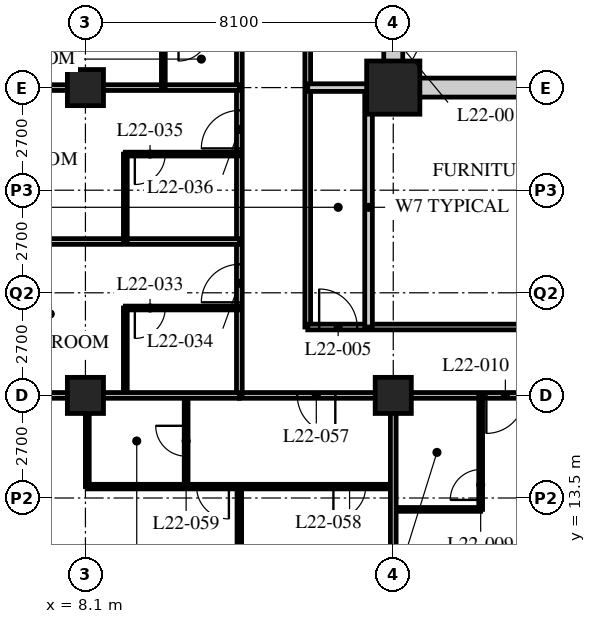
"""IFC4 building model, lengths in metres.
Left out: names, types, materials, properties, quantities, classifications, styles, units other than length and angle.
Written with IfcOpenShell. Run it as: python <this file> out.ifc"""

import sys

from ifc_helpers import new_model, si_unit, direction, frame, frame_2d, origin, origin_2d, place, context, subcontext, project, spatial, rectangle, hollow_rectangle, extrude, element, fill, save


model = new_model("IFC4")
c1 = context("Model", 3, precision=1e-05, world=origin(), true_north=direction((0.0, 1.0)))
c2 = subcontext(c1, "Body", "Model", "MODEL_VIEW")
j1 = project(units=[si_unit("LENGTHUNIT", "METRE"), si_unit("PLANEANGLEUNIT", "RADIAN")], contexts=[c1])
p1 = place(None, origin())
s1 = spatial("IfcSite", under=j1, at=p1, CompositionType="ELEMENT")
p2 = place(p1, origin())
s2 = spatial("IfcBuilding", under=s1, at=p2, CompositionType="ELEMENT")
p3 = place(p2, frame((0.0, 0.0, 87.4)))
s3 = spatial("IfcBuildingStorey", under=s2, at=p3, CompositionType="ELEMENT", Elevation=87.4)
for number, where, z_axis, x_axis in (
    (1, (8.1, 16.2, 0.0), (0.0, 0.0, 1.0), (1.0, 0.0, 0.0)),
    (2, (8.1, 24.3, 0.0), (0.0, 0.0, 1.0), (1.0, 0.0, 0.0)),
    (3, (16.2, 16.2, 0.0), (0.0, 0.0, 1.0), (1.0, 0.0, 0.0)),
):
    element("IfcColumn", number, at=place(p3, frame(where, z_axis=z_axis, x_axis=x_axis)), inside=s3, PredefinedType="COLUMN", context=c2, shape_type="SweptSolid", body=[
        extrude(hollow_rectangle(XDim=0.95, YDim=0.95, WallThickness=0.095, at=origin_2d()), origin(), (0.0, 0.0, 1.0), 3.4),
    ])
p4 = place(p3, frame((16.2, 24.3, 0.0), z_axis=(0.0, 0.0, 1.0), x_axis=(1.0, 0.0, 0.0)))
e4 = element("IfcColumn", 4, at=p4, inside=s3, PredefinedType="COLUMN", context=c2, shape_type="SweptSolid", body=[
    extrude(hollow_rectangle(XDim=1.4, YDim=1.4, WallThickness=0.12, at=origin_2d()), origin(), (0.0, 0.0, 1.0), 3.4),
])
p5 = place(p3, frame((12.15, 16.2, 0.0), z_axis=(0.0, 0.0, 1.0), x_axis=(1.0, 0.0, 0.0)))
e5 = element("IfcWall", 5, at=p5, inside=s3, PredefinedType="PARTITIONING", context=c2, shape_type="SweptSolid", body=[
    extrude(rectangle(XDim=32.4, YDim=0.15, at=frame_2d((16.2, 0.0))), origin(), (0.0, 0.0, 1.0), 2.388),
])
p6 = place(p5, frame((6.5, 0.0, 0.0)))
e6 = element("IfcOpeningElement", 6, at=p6, cuts=e5, PredefinedType="OPENING", context=c2, shape_type="SweptSolid", body=[
    extrude(rectangle(XDim=1.0, YDim=2.1, at=frame_2d((0.5, 1.05))), frame((0.0, 0.085, 0.0), z_axis=(0.0, -1.0, 0.0), x_axis=(1.0, 0.0, 0.0)), (0.0, 0.0, 1.0), 0.17),
])
p7 = place(p5, frame((8.4, 0.0, 0.0)))
e7 = element("IfcOpeningElement", 7, at=p7, cuts=e5, PredefinedType="OPENING", context=c2, shape_type="SweptSolid", body=[
    extrude(rectangle(XDim=1.0, YDim=2.1, at=frame_2d((0.5, 1.05))), frame((0.0, 0.085, 0.0), z_axis=(0.0, -1.0, 0.0), x_axis=(1.0, 0.0, 0.0)), (0.0, 0.0, 1.0), 0.17),
])
p8 = place(p5, frame((14.9, 0.0, 0.0)))
e8 = element("IfcOpeningElement", 8, at=p8, cuts=e5, PredefinedType="OPENING", context=c2, shape_type="SweptSolid", body=[
    extrude(rectangle(XDim=1.0, YDim=2.1, at=frame_2d((0.5, 1.05))), frame((0.0, 0.085, 0.0), z_axis=(0.0, -1.0, 0.0), x_axis=(1.0, 0.0, 0.0)), (0.0, 0.0, 1.0), 0.17),
])
p9 = place(p5, frame((16.5, 0.0, 0.0)))
e9 = element("IfcOpeningElement", 9, at=p9, cuts=e5, PredefinedType="OPENING", context=c2, shape_type="SweptSolid", body=[
    extrude(rectangle(XDim=1.0, YDim=2.1, at=frame_2d((0.5, 1.05))), frame((0.0, 0.085, 0.0), z_axis=(0.0, -1.0, 0.0), x_axis=(1.0, 0.0, 0.0)), (0.0, 0.0, 1.0), 0.17),
])
p10 = place(p5, frame((23.0, 0.0, 0.0)))
e10 = element("IfcOpeningElement", 10, at=p10, cuts=e5, PredefinedType="OPENING", context=c2, shape_type="SweptSolid", body=[
    extrude(rectangle(XDim=1.0, YDim=2.1, at=frame_2d((0.5, 1.05))), frame((0.0, 0.085, 0.0), z_axis=(0.0, -1.0, 0.0), x_axis=(1.0, 0.0, 0.0)), (0.0, 0.0, 1.0), 0.17),
])
p11 = place(p5, frame((24.9, 0.0, 0.0)))
e11 = element("IfcOpeningElement", 11, at=p11, cuts=e5, PredefinedType="OPENING", context=c2, shape_type="SweptSolid", body=[
    extrude(rectangle(XDim=1.0, YDim=2.1, at=frame_2d((0.5, 1.05))), frame((0.0, 0.085, 0.0), z_axis=(0.0, -1.0, 0.0), x_axis=(1.0, 0.0, 0.0)), (0.0, 0.0, 1.0), 0.17),
])
p12 = place(p5, frame((1.525, 0.0, 0.0)))
e12 = element("IfcOpeningElement", 12, at=p12, cuts=e5, PredefinedType="OPENING", context=c2, shape_type="SweptSolid", body=[
    extrude(rectangle(XDim=1.0, YDim=2.1, at=frame_2d((0.5, 1.05))), frame((0.0, 0.085, 0.0), z_axis=(0.0, -1.0, 0.0), x_axis=(1.0, 0.0, 0.0)), (0.0, 0.0, 1.0), 0.17),
])
p13 = place(p5, frame((29.875, 0.0, 0.0)))
e13 = element("IfcOpeningElement", 13, at=p13, cuts=e5, PredefinedType="OPENING", context=c2, shape_type="SweptSolid", body=[
    extrude(rectangle(XDim=1.0, YDim=2.1, at=frame_2d((0.5, 1.05))), frame((0.0, 0.085, 0.0), z_axis=(0.0, -1.0, 0.0), x_axis=(1.0, 0.0, 0.0)), (0.0, 0.0, 1.0), 0.17),
])
p14 = place(p3, frame((12.15, 16.2, 0.0), z_axis=(0.0, 0.0, 1.0), x_axis=(0.0, 1.0, 0.0)))
e14 = element("IfcWall", 14, at=p14, inside=s3, PredefinedType="PARTITIONING", context=c2, shape_type="SweptSolid", body=[
    extrude(rectangle(XDim=26.1, YDim=0.15, at=frame_2d((13.05, 0.0))), origin(), (0.0, 0.0, 1.0), 3.15),
])
p15 = place(p14, frame((2.45, 0.0, 0.0)))
e15 = element("IfcOpeningElement", 15, at=p15, cuts=e14, PredefinedType="OPENING", context=c2, shape_type="SweptSolid", body=[
    extrude(rectangle(XDim=1.0, YDim=2.1, at=frame_2d((0.5, 1.05))), frame((0.0, 0.085, 0.0), z_axis=(0.0, -1.0, 0.0), x_axis=(1.0, 0.0, 0.0)), (0.0, 0.0, 1.0), 0.17),
])
p16 = place(p14, frame((6.5, 0.0, 0.0)))
e16 = element("IfcOpeningElement", 16, at=p16, cuts=e14, PredefinedType="OPENING", context=c2, shape_type="SweptSolid", body=[
    extrude(rectangle(XDim=1.0, YDim=2.1, at=frame_2d((0.5, 1.05))), frame((0.0, 0.085, 0.0), z_axis=(0.0, -1.0, 0.0), x_axis=(1.0, 0.0, 0.0)), (0.0, 0.0, 1.0), 0.17),
])
p17 = place(p14, frame((10.0, 0.0, 0.0)))
e17 = element("IfcOpeningElement", 17, at=p17, cuts=e14, PredefinedType="OPENING", context=c2, shape_type="SweptSolid", body=[
    extrude(rectangle(XDim=1.0, YDim=2.1, at=frame_2d((0.5, 1.05))), frame((0.0, 0.085, 0.0), z_axis=(0.0, -1.0, 0.0), x_axis=(1.0, 0.0, 0.0)), (0.0, 0.0, 1.0), 0.17),
])
p18 = place(p14, frame((18.1, 0.0, 0.0)))
e18 = element("IfcOpeningElement", 18, at=p18, cuts=e14, PredefinedType="OPENING", context=c2, shape_type="SweptSolid", body=[
    extrude(rectangle(XDim=1.0, YDim=2.1, at=frame_2d((0.5, 1.05))), frame((0.0, 0.085, 0.0), z_axis=(0.0, -1.0, 0.0), x_axis=(1.0, 0.0, 0.0)), (0.0, 0.0, 1.0), 0.17),
])
p19 = place(p3, frame((13.95, 40.5, 0.0), z_axis=(0.0, 0.0, 1.0), x_axis=(0.0, -1.0, 0.0)))
e19 = element("IfcWall", 19, at=p19, inside=s3, PredefinedType="PARTITIONING", context=c2, shape_type="SweptSolid", body=[
    extrude(rectangle(XDim=22.5, YDim=0.15, at=frame_2d((11.25, 0.0))), origin(), (0.0, 0.0, 1.0), 3.15),
])
p20 = place(p19, frame((11.65, 0.0, 0.0)))
e20 = element("IfcOpeningElement", 20, at=p20, cuts=e19, PredefinedType="OPENING", context=c2, shape_type="SweptSolid", body=[
    extrude(rectangle(XDim=1.0, YDim=2.1, at=frame_2d((0.5, 1.05))), frame((0.0, 0.085, 0.0), z_axis=(0.0, -1.0, 0.0), x_axis=(1.0, 0.0, 0.0)), (0.0, 0.0, 1.0), 0.17),
])
p21 = place(p19, frame((3.55, 0.0, 0.0)))
e21 = element("IfcOpeningElement", 21, at=p21, cuts=e19, PredefinedType="OPENING", context=c2, shape_type="SweptSolid", body=[
    extrude(rectangle(XDim=1.0, YDim=2.1, at=frame_2d((0.5, 1.05))), frame((0.0, 0.085, 0.0), z_axis=(0.0, -1.0, 0.0), x_axis=(1.0, 0.0, 0.0)), (0.0, 0.0, 1.0), 0.17),
])
p22 = place(p3, frame((13.95, 18.0, 0.0), z_axis=(0.0, 0.0, 1.0), x_axis=(1.0, 0.0, 0.0)))
e22 = element("IfcWall", 22, at=p22, inside=s3, PredefinedType="PARTITIONING", context=c2, shape_type="SweptSolid", body=[
    extrude(rectangle(XDim=13.19, YDim=0.15, at=frame_2d((6.595, 0.0))), origin(), (0.0, 0.0, 1.0), 3.15),
])
p23 = place(p22, frame((0.3, 0.0, 0.0)))
e23 = element("IfcOpeningElement", 23, at=p23, cuts=e22, PredefinedType="OPENING", context=c2, shape_type="SweptSolid", body=[
    extrude(rectangle(XDim=1.0, YDim=2.1, at=frame_2d((0.5, 1.05))), frame((0.0, 0.085, 0.0), z_axis=(0.0, -1.0, 0.0), x_axis=(1.0, 0.0, 0.0)), (0.0, 0.0, 1.0), 0.17),
])
p24 = place(p22, frame((6.9, 0.0, 0.0)))
e24 = element("IfcOpeningElement", 24, at=p24, cuts=e22, PredefinedType="OPENING", context=c2, shape_type="SweptSolid", body=[
    extrude(rectangle(XDim=1.0, YDim=2.1, at=frame_2d((0.5, 1.05))), frame((0.0, 0.085, 0.0), z_axis=(0.0, -1.0, 0.0), x_axis=(1.0, 0.0, 0.0)), (0.0, 0.0, 1.0), 0.17),
])
p25 = place(p3, frame((15.55, 18.0, 0.0), z_axis=(0.0, 0.0, 1.0), x_axis=(0.0, 1.0, 0.0)))
e25 = element("IfcWall", 25, at=p25, inside=s3, PredefinedType="SOLIDWALL", context=c2, shape_type="SweptSolid", body=[
    extrude(rectangle(XDim=6.3, YDim=0.2, at=frame_2d((3.15, 0.0))), origin(), (0.0, 0.0, 1.0), 3.15),
])
p26 = place(p3, frame((13.95, 24.3, 0.0), z_axis=(0.0, 0.0, 1.0), x_axis=(1.0, 0.0, 0.0)))
e26 = element("IfcWall", 26, at=p26, inside=s3, PredefinedType="SOLIDWALL", context=c2, shape_type="SweptSolid", body=[
    extrude(rectangle(XDim=2.25, YDim=0.2, at=frame_2d((1.125, 0.0))), origin(), (0.0, 0.0, 1.0), 2.05),
])
p27 = place(p3, frame((16.2, 13.2, 0.0), z_axis=(0.0, 0.0, 1.0), x_axis=(1.0, 0.0, 0.0)))
e27 = element("IfcWall", 27, at=p27, inside=s3, PredefinedType="PARTITIONING", context=c2, shape_type="SweptSolid", body=[
    extrude(rectangle(XDim=2.3, YDim=0.1, at=frame_2d((1.15, 0.0))), origin(), (0.0, 0.0, 1.0), 3.15),
])
p28 = place(p3, frame((18.5, 16.2, 0.0), z_axis=(0.0, 0.0, 1.0), x_axis=(0.0, -1.0, 0.0)))
e28 = element("IfcWall", 28, at=p28, inside=s3, PredefinedType="PARTITIONING", context=c2, shape_type="SweptSolid", body=[
    extrude(rectangle(XDim=3.0, YDim=0.1, at=frame_2d((1.5, 0.0))), origin(), (0.0, 0.0, 1.0), 3.15),
])
p29 = place(p28, frame((1.95, 0.0, 0.0)))
e29 = element("IfcOpeningElement", 29, at=p29, cuts=e28, PredefinedType="OPENING", context=c2, shape_type="SweptSolid", body=[
    extrude(rectangle(XDim=0.8, YDim=2.1, at=frame_2d((0.4, 1.05))), frame((0.0, 0.06, 0.0), z_axis=(0.0, -1.0, 0.0), x_axis=(1.0, 0.0, 0.0)), (0.0, 0.0, 1.0), 0.12),
])
p30 = place(p3, frame((9.15, 16.2, 0.0), z_axis=(0.0, 0.0, 1.0), x_axis=(0.0, 1.0, 0.0)))
e30 = element("IfcWall", 30, at=p30, inside=s3, PredefinedType="PARTITIONING", context=c2, shape_type="SweptSolid", body=[
    extrude(rectangle(XDim=2.3, YDim=0.1, at=frame_2d((1.15, 0.0))), origin(), (0.0, 0.0, 1.0), 3.15),
])
p31 = place(p3, frame((12.15, 18.5, 0.0), z_axis=(0.0, 0.0, 1.0), x_axis=(-1.0, 0.0, 0.0)))
e31 = element("IfcWall", 31, at=p31, inside=s3, PredefinedType="PARTITIONING", context=c2, shape_type="SweptSolid", body=[
    extrude(rectangle(XDim=3.0, YDim=0.1, at=frame_2d((1.5, 0.0))), origin(), (0.0, 0.0, 1.0), 3.15),
])
p32 = place(p31, frame((1.95, 0.0, 0.0)))
e32 = element("IfcOpeningElement", 32, at=p32, cuts=e31, PredefinedType="OPENING", context=c2, shape_type="SweptSolid", body=[
    extrude(rectangle(XDim=0.8, YDim=2.1, at=frame_2d((0.4, 1.05))), frame((0.0, 0.06, 0.0), z_axis=(0.0, -1.0, 0.0), x_axis=(1.0, 0.0, 0.0)), (0.0, 0.0, 1.0), 0.12),
])
p33 = place(p3, frame((12.15, 20.25, 0.0), z_axis=(0.0, 0.0, 1.0), x_axis=(-1.0, 0.0, 0.0)))
e33 = element("IfcWall", 33, at=p33, inside=s3, PredefinedType="PARTITIONING", context=c2, shape_type="SweptSolid", body=[
    extrude(rectangle(XDim=11.85, YDim=0.15, at=frame_2d((5.925, 0.0))), origin(), (0.0, 0.0, 1.0), 3.15),
])
p34 = place(p3, frame((9.15, 20.25, 0.0), z_axis=(0.0, 0.0, 1.0), x_axis=(0.0, 1.0, 0.0)))
e34 = element("IfcWall", 34, at=p34, inside=s3, PredefinedType="PARTITIONING", context=c2, shape_type="SweptSolid", body=[
    extrude(rectangle(XDim=2.3, YDim=0.1, at=frame_2d((1.15, 0.0))), origin(), (0.0, 0.0, 1.0), 3.15),
])
p35 = place(p3, frame((12.15, 22.55, 0.0), z_axis=(0.0, 0.0, 1.0), x_axis=(-1.0, 0.0, 0.0)))
e35 = element("IfcWall", 35, at=p35, inside=s3, PredefinedType="PARTITIONING", context=c2, shape_type="SweptSolid", body=[
    extrude(rectangle(XDim=3.0, YDim=0.1, at=frame_2d((1.5, 0.0))), origin(), (0.0, 0.0, 1.0), 3.15),
])
p36 = place(p35, frame((1.95, 0.0, 0.0)))
e36 = element("IfcOpeningElement", 36, at=p36, cuts=e35, PredefinedType="OPENING", context=c2, shape_type="SweptSolid", body=[
    extrude(rectangle(XDim=0.8, YDim=2.1, at=frame_2d((0.4, 1.05))), frame((0.0, 0.06, 0.0), z_axis=(0.0, -1.0, 0.0), x_axis=(1.0, 0.0, 0.0)), (0.0, 0.0, 1.0), 0.12),
])
p37 = place(p3, frame((12.15, 24.3, 0.0), z_axis=(0.0, 0.0, 1.0), x_axis=(-1.0, 0.0, 0.0)))
e37 = element("IfcWall", 37, at=p37, inside=s3, PredefinedType="PARTITIONING", context=c2, shape_type="SweptSolid", body=[
    extrude(rectangle(XDim=11.85, YDim=0.15, at=frame_2d((5.925, 0.0))), origin(), (0.0, 0.0, 1.0), 2.05),
])
p38 = place(p3, frame((10.15, 24.3, 0.0), z_axis=(0.0, 0.0, 1.0), x_axis=(0.0, 1.0, 0.0)))
e38 = element("IfcWall", 38, at=p38, inside=s3, PredefinedType="PARTITIONING", context=c2, shape_type="SweptSolid", body=[
    extrude(rectangle(XDim=1.5, YDim=0.1, at=frame_2d((0.75, 0.0))), origin(), (0.0, 0.0, 1.0), 3.15),
])
p39 = place(p3, frame((10.75, 16.2, 0.0), z_axis=(0.0, 0.0, 1.0), x_axis=(0.0, -1.0, 0.0)))
e39 = element("IfcWall", 39, at=p39, inside=s3, PredefinedType="PARTITIONING", context=c2, shape_type="SweptSolid", body=[
    extrude(rectangle(XDim=2.4, YDim=0.1, at=frame_2d((1.2, 0.0))), origin(), (0.0, 0.0, 1.0), 3.15),
])
p40 = place(p39, frame((0.8, 0.0, 0.0)))
e40 = element("IfcOpeningElement", 40, at=p40, cuts=e39, PredefinedType="OPENING", context=c2, shape_type="SweptSolid", body=[
    extrude(rectangle(XDim=0.8, YDim=2.1, at=frame_2d((0.4, 1.05))), frame((0.0, 0.06, 0.0), z_axis=(0.0, -1.0, 0.0), x_axis=(1.0, 0.0, 0.0)), (0.0, 0.0, 1.0), 0.12),
])
p41 = place(p3, frame((8.15, 16.2, 0.0), z_axis=(0.0, 0.0, 1.0), x_axis=(0.0, -1.0, 0.0)))
e41 = element("IfcWall", 41, at=p41, inside=s3, PredefinedType="PARTITIONING", context=c2, shape_type="SweptSolid", body=[
    extrude(rectangle(XDim=2.4, YDim=0.1, at=frame_2d((1.2, 0.0))), origin(), (0.0, 0.0, 1.0), 2.05),
])
p42 = place(p3, frame((8.15, 13.8, 0.0), z_axis=(0.0, 0.0, 1.0), x_axis=(1.0, 0.0, 0.0)))
e42 = element("IfcWall", 42, at=p42, inside=s3, PredefinedType="PARTITIONING", context=c2, shape_type="SweptSolid", body=[
    extrude(rectangle(XDim=8.05, YDim=0.12, at=frame_2d((4.025, 0.0))), origin(), (0.0, 0.0, 1.0), 3.15),
])
p43 = place(p42, frame((6.475, 0.0, 0.0)))
e43 = element("IfcOpeningElement", 43, at=p43, cuts=e42, PredefinedType="OPENING", context=c2, shape_type="SweptSolid", body=[
    extrude(rectangle(XDim=0.85, YDim=2.1, at=frame_2d((0.425, 1.05))), frame((0.0, 0.07, 0.0), z_axis=(0.0, -1.0, 0.0), x_axis=(1.0, 0.0, 0.0)), (0.0, 0.0, 1.0), 0.14),
])
p44 = place(p42, frame((2.875, 0.0, 0.0)))
e44 = element("IfcOpeningElement", 44, at=p44, cuts=e42, PredefinedType="OPENING", context=c2, shape_type="SweptSolid", body=[
    extrude(rectangle(XDim=0.85, YDim=2.1, at=frame_2d((0.425, 1.05))), frame((0.0, 0.07, 0.0), z_axis=(0.0, -1.0, 0.0), x_axis=(1.0, 0.0, 0.0)), (0.0, 0.0, 1.0), 0.14),
])
p45 = place(p3, frame((12.15, 13.8, 0.0), z_axis=(0.0, 0.0, 1.0), x_axis=(0.0, -1.0, 0.0)))
e45 = element("IfcWall", 45, at=p45, inside=s3, PredefinedType="PARTITIONING", context=c2, shape_type="SweptSolid", body=[
    extrude(rectangle(XDim=13.5, YDim=0.12, at=frame_2d((6.75, 0.0))), origin(), (0.0, 0.0, 1.0), 3.15),
])
p46 = place(p3, frame((0.3, 16.2, 0.0), z_axis=(0.0, 0.0, 1.0), x_axis=(1.0, 0.0, 0.0)))
e46 = element("IfcWall", 46, at=p46, inside=s3, PredefinedType="PARTITIONING", context=c2, shape_type="SweptSolid", body=[
    extrude(rectangle(XDim=11.85, YDim=0.15, at=frame_2d((5.925, 0.0))), origin(), (0.0, 0.0, 1.0), 2.388),
])
p47 = place(p3, frame((16.2, 16.2, 0.0), z_axis=(0.0, 0.0, 1.0), x_axis=(0.0, -1.0, 0.0)))
e47 = element("IfcWall", 47, at=p47, inside=s3, PredefinedType="PARTITIONING", context=c2, shape_type="SweptSolid", body=[
    extrude(rectangle(XDim=15.9, YDim=0.15, at=frame_2d((7.95, 0.0))), origin(), (0.0, 0.0, 1.0), 2.05),
])
p48 = place(p3, frame((15.95, 24.3, 0.0), z_axis=(0.0, 0.0, 1.0), x_axis=(1.0, 0.0, 0.0)))
e48 = element("IfcWall", 48, at=p48, inside=s3, PredefinedType="SOLIDWALL", context=c2, shape_type="SweptSolid", body=[
    extrude(rectangle(XDim=8.35, YDim=0.5, at=frame_2d((4.175, 0.0))), origin(), (0.0, 0.0, 1.0), 2.388),
])
p49 = place(p3, frame((16.2, 24.55, 0.0), z_axis=(0.0, 0.0, 1.0), x_axis=(0.0, 1.0, 0.0)))
e49 = element("IfcWall", 49, at=p49, inside=s3, PredefinedType="SOLIDWALL", context=c2, shape_type="SweptSolid", body=[
    extrude(rectangle(XDim=15.7, YDim=0.5, at=frame_2d((7.85, 0.0))), origin(), (0.0, 0.0, 1.0), 2.05),
])
p50 = place(p23, origin())
e50 = element("IfcDoor", 50, at=p50, inside=s3, OperationType="SINGLE_SWING_LEFT", PredefinedType="DOOR", context=c2, shape_type="SweptSolid", body=[
    extrude(rectangle(XDim=1.0, YDim=2.1, at=frame_2d((0.5, 1.05))), frame((0.0, 0.025, 0.0), z_axis=(0.0, -1.0, 0.0), x_axis=(1.0, 0.0, 0.0)), (0.0, 0.0, 1.0), 0.05),
])
fill(e23, e50)
p51 = place(p29, origin())
e51 = element("IfcDoor", 51, at=p51, inside=s3, OperationType="SINGLE_SWING_LEFT", PredefinedType="DOOR", context=c2, shape_type="SweptSolid", body=[
    extrude(rectangle(XDim=0.8, YDim=2.1, at=frame_2d((0.4, 1.05))), frame((0.0, 0.025, 0.0), z_axis=(0.0, -1.0, 0.0), x_axis=(1.0, 0.0, 0.0)), (0.0, 0.0, 1.0), 0.05),
])
fill(e29, e51)
p52 = place(p6, origin())
e52 = element("IfcDoor", 52, at=p52, inside=s3, OperationType="SINGLE_SWING_RIGHT", PredefinedType="DOOR", context=c2, shape_type="SweptSolid", body=[
    extrude(rectangle(XDim=1.0, YDim=2.1, at=frame_2d((0.5, 1.05))), frame((0.0, 0.025, 0.0), z_axis=(0.0, -1.0, 0.0), x_axis=(1.0, 0.0, 0.0)), (0.0, 0.0, 1.0), 0.05),
])
fill(e6, e52)
p53 = place(p32, origin())
e53 = element("IfcDoor", 53, at=p53, inside=s3, OperationType="SINGLE_SWING_RIGHT", PredefinedType="DOOR", context=c2, shape_type="SweptSolid", body=[
    extrude(rectangle(XDim=0.8, YDim=2.1, at=frame_2d((0.4, 1.05))), frame((0.0, 0.025, 0.0), z_axis=(0.0, -1.0, 0.0), x_axis=(1.0, 0.0, 0.0)), (0.0, 0.0, 1.0), 0.05),
])
fill(e32, e53)
p54 = place(p15, origin())
e54 = element("IfcDoor", 54, at=p54, inside=s3, OperationType="SINGLE_SWING_LEFT", PredefinedType="DOOR", context=c2, shape_type="SweptSolid", body=[
    extrude(rectangle(XDim=1.0, YDim=2.1, at=frame_2d((0.5, 1.05))), frame((0.0, 0.025, 0.0), z_axis=(0.0, -1.0, 0.0), x_axis=(1.0, 0.0, 0.0)), (0.0, 0.0, 1.0), 0.05),
])
fill(e15, e54)
p55 = place(p36, origin())
e55 = element("IfcDoor", 55, at=p55, inside=s3, OperationType="SINGLE_SWING_RIGHT", PredefinedType="DOOR", context=c2, shape_type="SweptSolid", body=[
    extrude(rectangle(XDim=0.8, YDim=2.1, at=frame_2d((0.4, 1.05))), frame((0.0, 0.025, 0.0), z_axis=(0.0, -1.0, 0.0), x_axis=(1.0, 0.0, 0.0)), (0.0, 0.0, 1.0), 0.05),
])
fill(e36, e55)
p56 = place(p16, origin())
e56 = element("IfcDoor", 56, at=p56, inside=s3, OperationType="SINGLE_SWING_LEFT", PredefinedType="DOOR", context=c2, shape_type="SweptSolid", body=[
    extrude(rectangle(XDim=1.0, YDim=2.1, at=frame_2d((0.5, 1.05))), frame((0.0, 0.025, 0.0), z_axis=(0.0, -1.0, 0.0), x_axis=(1.0, 0.0, 0.0)), (0.0, 0.0, 1.0), 0.05),
])
fill(e16, e56)
p57 = place(p12, origin())
e57 = element("IfcDoor", 57, at=p57, inside=s3, OperationType="SINGLE_SWING_LEFT", PredefinedType="DOOR", context=c2, shape_type="SweptSolid", body=[
    extrude(rectangle(XDim=1.0, YDim=2.1, at=frame_2d((0.5, 1.05))), frame((0.0, 0.025, 0.0), z_axis=(0.0, -1.0, 0.0), x_axis=(1.0, 0.0, 0.0)), (0.0, 0.0, 1.0), 0.05),
])
fill(e12, e57)
p58 = place(p43, origin())
e58 = element("IfcDoor", 58, at=p58, inside=s3, OperationType="SINGLE_SWING_RIGHT", PredefinedType="DOOR", context=c2, shape_type="SweptSolid", body=[
    extrude(rectangle(XDim=0.85, YDim=2.1, at=frame_2d((0.425, 1.05))), frame((0.0, 0.025, 0.0), z_axis=(0.0, -1.0, 0.0), x_axis=(1.0, 0.0, 0.0)), (0.0, 0.0, 1.0), 0.05),
])
fill(e43, e58)
p59 = place(p40, origin())
e59 = element("IfcDoor", 59, at=p59, inside=s3, OperationType="SINGLE_SWING_RIGHT", PredefinedType="DOOR", context=c2, shape_type="SweptSolid", body=[
    extrude(rectangle(XDim=0.8, YDim=2.1, at=frame_2d((0.4, 1.05))), frame((0.0, 0.025, 0.0), z_axis=(0.0, -1.0, 0.0), x_axis=(1.0, 0.0, 0.0)), (0.0, 0.0, 1.0), 0.05),
])
fill(e40, e59)
p60 = place(p44, origin())
e60 = element("IfcDoor", 60, at=p60, inside=s3, OperationType="SINGLE_SWING_LEFT", PredefinedType="DOOR", context=c2, shape_type="SweptSolid", body=[
    extrude(rectangle(XDim=0.85, YDim=2.1, at=frame_2d((0.425, 1.05))), frame((0.0, 0.025, 0.0), z_axis=(0.0, -1.0, 0.0), x_axis=(1.0, 0.0, 0.0)), (0.0, 0.0, 1.0), 0.05),
])
fill(e44, e60)
save(model, sys.argv[1])
